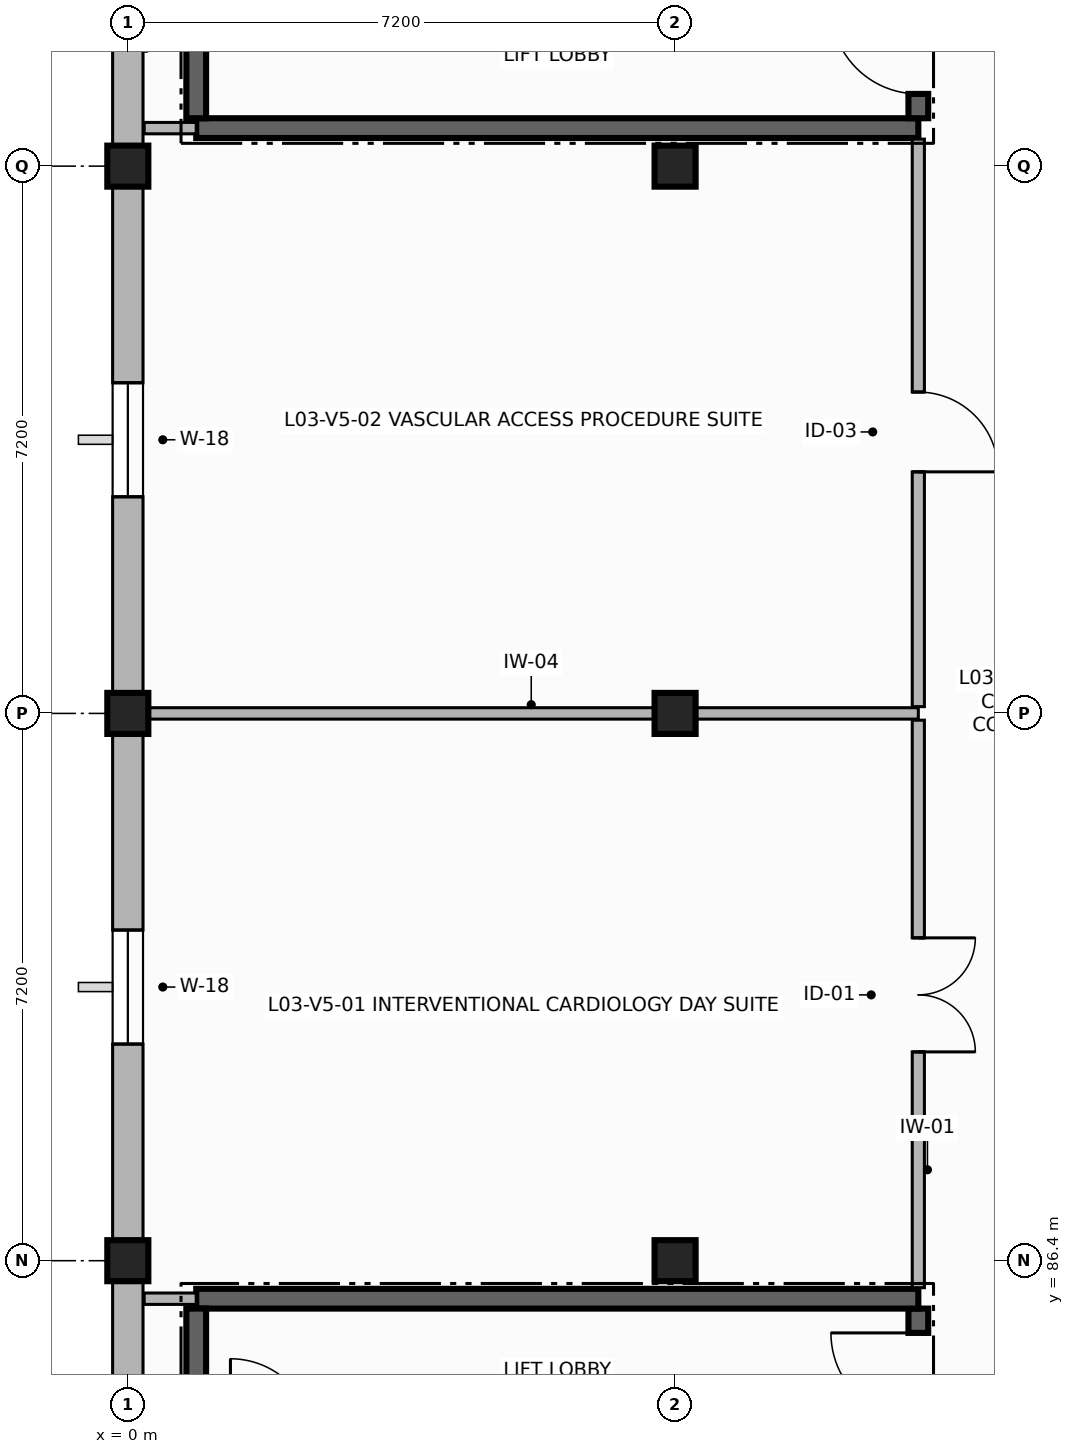
"""IFC4 building model, lengths in metres.
Left out: names, types, materials, properties, quantities, classifications, styles, units other than length and angle.
Written with IfcOpenShell. Run it as: python <this file> out.ifc"""

import sys

from ifc_helpers import new_model, si_unit, direction, frame, frame_2d, origin, origin_2d, place, context, subcontext, project, spatial, rectangle, extrude, element, fill, save


model = new_model("IFC4")
c1 = context("Model", 3, precision=1e-05, world=origin(), true_north=direction((0.0, 1.0)))
c2 = subcontext(c1, "Body", "Model", "MODEL_VIEW")
j1 = project(units=[si_unit("LENGTHUNIT", "METRE"), si_unit("PLANEANGLEUNIT", "RADIAN")], contexts=[c1])
p1 = place(None, origin())
s1 = spatial("IfcSite", under=j1, at=p1, CompositionType="ELEMENT")
p2 = place(p1, origin())
s2 = spatial("IfcBuilding", under=s1, at=p2, CompositionType="ELEMENT")
p3 = place(p2, frame((0.0, 0.0, 12.3)))
s3 = spatial("IfcBuildingStorey", under=s2, at=p3, CompositionType="ELEMENT", Elevation=12.3)
for number, where, z_axis, x_axis in (
    (1, (0.0, 86.4, 0.0), (0.0, 0.0, 1.0), (1.0, 0.0, 0.0)),
    (2, (0.0, 93.6, 0.0), (0.0, 0.0, 1.0), (1.0, 0.0, 0.0)),
    (3, (0.0, 100.8, 0.0), (0.0, 0.0, 1.0), (1.0, 0.0, 0.0)),
    (4, (7.2, 86.4, 0.0), (0.0, 0.0, 1.0), (1.0, 0.0, 0.0)),
    (5, (7.2, 93.6, 0.0), (0.0, 0.0, 1.0), (1.0, 0.0, 0.0)),
    (6, (7.2, 100.8, 0.0), (0.0, 0.0, 1.0), (1.0, 0.0, 0.0)),
):
    element("IfcColumn", number, at=place(p3, frame(where, z_axis=z_axis, x_axis=x_axis)), inside=s3, PredefinedType="COLUMN", context=c2, shape_type="SweptSolid", body=[
        extrude(rectangle(XDim=0.54, YDim=0.54, at=origin_2d()), origin(), (0.0, 0.0, 1.0), 3.39),
    ])
p4 = place(p3, frame((0.0, 108.0, 0.0), z_axis=(0.0, 0.0, 1.0), x_axis=(0.0, -1.0, 0.0)))
e7 = element("IfcWall", 7, at=p4, inside=s3, PredefinedType="SOLIDWALL", context=c2, shape_type="SweptSolid", body=[
    extrude(rectangle(XDim=7.2, YDim=0.4, at=frame_2d((3.6, 0.0))), origin(), (0.0, 0.0, 1.0), 2.72),
])
p5 = place(p4, frame((2.6, 0.0, 0.9)))
e8 = element("IfcOpeningElement", 8, at=p5, cuts=e7, PredefinedType="OPENING", context=c2, shape_type="SweptSolid", body=[
    extrude(rectangle(XDim=1.5, YDim=1.6, at=frame_2d((0.75, 0.8))), frame((0.0, 0.21, 0.0), z_axis=(0.0, -1.0, 0.0), x_axis=(1.0, 0.0, 0.0)), (0.0, 0.0, 1.0), 0.42),
])
p6 = place(p3, frame((0.0, 100.8, 0.0), z_axis=(0.0, 0.0, 1.0), x_axis=(0.0, -1.0, 0.0)))
e9 = element("IfcWall", 9, at=p6, inside=s3, PredefinedType="SOLIDWALL", context=c2, shape_type="SweptSolid", body=[
    extrude(rectangle(XDim=7.2, YDim=0.4, at=frame_2d((3.6, 0.0))), origin(), (0.0, 0.0, 1.0), 2.72),
])
p7 = place(p6, frame((2.85, 0.0, 0.9)))
e10 = element("IfcOpeningElement", 10, at=p7, cuts=e9, PredefinedType="OPENING", context=c2, shape_type="SweptSolid", body=[
    extrude(rectangle(XDim=1.5, YDim=1.6, at=frame_2d((0.75, 0.8))), frame((0.0, 0.21, 0.0), z_axis=(0.0, -1.0, 0.0), x_axis=(1.0, 0.0, 0.0)), (0.0, 0.0, 1.0), 0.42),
])
p8 = place(p3, frame((0.0, 93.6, 0.0), z_axis=(0.0, 0.0, 1.0), x_axis=(0.0, -1.0, 0.0)))
e11 = element("IfcWall", 11, at=p8, inside=s3, PredefinedType="SOLIDWALL", context=c2, shape_type="SweptSolid", body=[
    extrude(rectangle(XDim=7.2, YDim=0.4, at=frame_2d((3.6, 0.0))), origin(), (0.0, 0.0, 1.0), 2.72),
])
p9 = place(p8, frame((2.85, 0.0, 0.9)))
e12 = element("IfcOpeningElement", 12, at=p9, cuts=e11, PredefinedType="OPENING", context=c2, shape_type="SweptSolid", body=[
    extrude(rectangle(XDim=1.5, YDim=1.6, at=frame_2d((0.75, 0.8))), frame((0.0, 0.21, 0.0), z_axis=(0.0, -1.0, 0.0), x_axis=(1.0, 0.0, 0.0)), (0.0, 0.0, 1.0), 0.42),
])
p10 = place(p3, frame((0.0, 86.4, 0.0), z_axis=(0.0, 0.0, 1.0), x_axis=(0.0, -1.0, 0.0)))
e13 = element("IfcWall", 13, at=p10, inside=s3, PredefinedType="SOLIDWALL", context=c2, shape_type="SweptSolid", body=[
    extrude(rectangle(XDim=7.2, YDim=0.4, at=frame_2d((3.6, 0.0))), origin(), (0.0, 0.0, 1.0), 2.72),
])
p11 = place(p10, frame((3.1, 0.0, 0.9)))
e14 = element("IfcOpeningElement", 14, at=p11, cuts=e13, PredefinedType="OPENING", context=c2, shape_type="SweptSolid", body=[
    extrude(rectangle(XDim=1.5, YDim=1.6, at=frame_2d((0.75, 0.8))), frame((0.0, 0.21, 0.0), z_axis=(0.0, -1.0, 0.0), x_axis=(1.0, 0.0, 0.0)), (0.0, 0.0, 1.0), 0.42),
])
p12 = place(p3, frame((10.4, 80.23, 0.0), z_axis=(0.0, 0.0, 1.0), x_axis=(0.0, 1.0, 0.0)))
e15 = element("IfcWall", 15, at=p12, inside=s3, PredefinedType="SHEAR", context=c2, shape_type="SweptSolid", body=[
    extrude(rectangle(XDim=5.54, YDim=0.26, at=frame_2d((2.77, 0.0))), origin(), (0.0, 0.0, 1.0), 3.39),
])
p13 = place(p12, frame((4.07, 0.0, 0.0)))
e16 = element("IfcOpeningElement", 16, at=p13, cuts=e15, PredefinedType="OPENING", context=c2, shape_type="SweptSolid", body=[
    extrude(rectangle(XDim=1.15, YDim=2.2, at=frame_2d((0.575, 1.1))), frame((0.0, 0.14, 0.0), z_axis=(0.0, -1.0, 0.0), x_axis=(1.0, 0.0, 0.0)), (0.0, 0.0, 1.0), 0.28),
])
p14 = place(p3, frame((10.4, 85.9, 0.0), z_axis=(0.0, 0.0, 1.0), x_axis=(-1.0, 0.0, 0.0)))
e17 = element("IfcWall", 17, at=p14, inside=s3, PredefinedType="SHEAR", context=c2, shape_type="SweptSolid", body=[
    extrude(rectangle(XDim=9.5, YDim=0.26, at=frame_2d((4.75, 0.0))), origin(), (0.0, 0.0, 1.0), 3.39),
])
p15 = place(p3, frame((0.9, 85.77, 0.0), z_axis=(0.0, 0.0, 1.0), x_axis=(0.0, -1.0, 0.0)))
e18 = element("IfcWall", 18, at=p15, inside=s3, PredefinedType="SHEAR", context=c2, shape_type="SweptSolid", body=[
    extrude(rectangle(XDim=5.54, YDim=0.26, at=frame_2d((2.77, 0.0))), origin(), (0.0, 0.0, 1.0), 3.39),
])
p16 = place(p3, frame((0.9, 101.3, 0.0), z_axis=(0.0, 0.0, 1.0), x_axis=(1.0, 0.0, 0.0)))
e19 = element("IfcWall", 19, at=p16, inside=s3, PredefinedType="SHEAR", context=c2, shape_type="SweptSolid", body=[
    extrude(rectangle(XDim=9.5, YDim=0.26, at=frame_2d((4.75, 0.0))), origin(), (0.0, 0.0, 1.0), 3.39),
])
p17 = place(p3, frame((10.4, 101.43, 0.0), z_axis=(0.0, 0.0, 1.0), x_axis=(0.0, 1.0, 0.0)))
e20 = element("IfcWall", 20, at=p17, inside=s3, PredefinedType="SHEAR", context=c2, shape_type="SweptSolid", body=[
    extrude(rectangle(XDim=5.54, YDim=0.26, at=frame_2d((2.77, 0.0))), origin(), (0.0, 0.0, 1.0), 3.39),
])
p18 = place(p17, frame((0.32, 0.0, 0.0)))
e21 = element("IfcOpeningElement", 21, at=p18, cuts=e20, PredefinedType="OPENING", context=c2, shape_type="SweptSolid", body=[
    extrude(rectangle(XDim=1.15, YDim=2.2, at=frame_2d((0.575, 1.1))), frame((0.0, 0.14, 0.0), z_axis=(0.0, -1.0, 0.0), x_axis=(1.0, 0.0, 0.0)), (0.0, 0.0, 1.0), 0.28),
])
p19 = place(p3, frame((0.9, 106.97, 0.0), z_axis=(0.0, 0.0, 1.0), x_axis=(0.0, -1.0, 0.0)))
e22 = element("IfcWall", 22, at=p19, inside=s3, PredefinedType="SHEAR", context=c2, shape_type="SweptSolid", body=[
    extrude(rectangle(XDim=5.54, YDim=0.26, at=frame_2d((2.77, 0.0))), origin(), (0.0, 0.0, 1.0), 3.39),
])
p20 = place(p3, frame((0.215, 93.6, 0.0), z_axis=(0.0, 0.0, 1.0), x_axis=(1.0, 0.0, 0.0)))
e23 = element("IfcWall", 23, at=p20, inside=s3, PredefinedType="PARTITIONING", context=c2, shape_type="SweptSolid", body=[
    extrude(rectangle(XDim=10.185, YDim=0.15, at=frame_2d((5.092, 0.0))), origin(), (0.0, 0.0, 1.0), 2.7),
])
p21 = place(p3, frame((10.4, 93.511, 0.0), z_axis=(0.0, 0.0, 1.0), x_axis=(0.0, -1.0, 0.0)))
e24 = element("IfcWall", 24, at=p21, inside=s3, PredefinedType="PARTITIONING", context=c2, shape_type="SweptSolid", body=[
    extrude(rectangle(XDim=7.466, YDim=0.16, at=frame_2d((3.733, 0.0))), origin(), (0.0, 0.0, 1.0), 2.7),
])
p22 = place(p21, frame((2.864, 0.0, 0.0)))
e25 = element("IfcOpeningElement", 25, at=p22, cuts=e24, PredefinedType="OPENING", context=c2, shape_type="SweptSolid", body=[
    extrude(rectangle(XDim=1.5, YDim=2.3, at=frame_2d((0.75, 1.15))), frame((0.0, 0.09, 0.0), z_axis=(0.0, -1.0, 0.0), x_axis=(1.0, 0.0, 0.0)), (0.0, 0.0, 1.0), 0.18),
])
for number, where, z_axis, x_axis in (
    (26, (0.9, 85.9, 0.0), (0.0, 0.0, 1.0), (-1.0, 0.0, 0.0)),
    (27, (0.215, 101.3, 0.0), (0.0, 0.0, 1.0), (1.0, 0.0, 0.0)),
):
    element("IfcWall", number, at=place(p3, frame(where, z_axis=z_axis, x_axis=x_axis)), inside=s3, PredefinedType="PARTITIONING", context=c2, shape_type="SweptSolid", body=[
        extrude(rectangle(XDim=0.685, YDim=0.15, at=frame_2d((0.342, 0.0))), origin(), (0.0, 0.0, 1.0), 2.7),
    ])
p23 = place(p3, frame((10.4, 101.155, 0.0), z_axis=(0.0, 0.0, 1.0), x_axis=(0.0, -1.0, 0.0)))
e28 = element("IfcWall", 28, at=p23, inside=s3, PredefinedType="PARTITIONING", context=c2, shape_type="SweptSolid", body=[
    extrude(rectangle(XDim=7.466, YDim=0.16, at=frame_2d((3.733, 0.0))), origin(), (0.0, 0.0, 1.0), 2.7),
])
p24 = place(p23, frame((3.327, 0.0, 0.0)))
e29 = element("IfcOpeningElement", 29, at=p24, cuts=e28, PredefinedType="OPENING", context=c2, shape_type="SweptSolid", body=[
    extrude(rectangle(XDim=1.05, YDim=2.15, at=frame_2d((0.525, 1.075))), frame((0.0, 0.09, 0.0), z_axis=(0.0, -1.0, 0.0), x_axis=(1.0, 0.0, 0.0)), (0.0, 0.0, 1.0), 0.18),
])
p25 = place(p7, origin())
e30 = element("IfcWindow", 30, at=p25, inside=s3, PartitioningType="SINGLE_PANEL", PredefinedType="WINDOW", context=c2, shape_type="SweptSolid", body=[
    extrude(rectangle(XDim=1.5, YDim=1.6, at=frame_2d((0.75, 0.8))), frame((0.0, 0.03, 0.0), z_axis=(0.0, -1.0, 0.0), x_axis=(1.0, 0.0, 0.0)), (0.0, 0.0, 1.0), 0.06),
])
fill(e10, e30)
p26 = place(p9, origin())
e31 = element("IfcWindow", 31, at=p26, inside=s3, PartitioningType="SINGLE_PANEL", PredefinedType="WINDOW", context=c2, shape_type="SweptSolid", body=[
    extrude(rectangle(XDim=1.5, YDim=1.6, at=frame_2d((0.75, 0.8))), frame((0.0, 0.03, 0.0), z_axis=(0.0, -1.0, 0.0), x_axis=(1.0, 0.0, 0.0)), (0.0, 0.0, 1.0), 0.06),
])
fill(e12, e31)
p27 = place(p13, origin())
e32 = element("IfcDoor", 32, at=p27, inside=s3, OperationType="SINGLE_SWING_RIGHT", PredefinedType="DOOR", context=c2, shape_type="SweptSolid", body=[
    extrude(rectangle(XDim=1.15, YDim=2.2, at=frame_2d((0.575, 1.1))), frame((0.0, 0.025, 0.0), z_axis=(0.0, -1.0, 0.0), x_axis=(1.0, 0.0, 0.0)), (0.0, 0.0, 1.0), 0.05),
])
fill(e16, e32)
p28 = place(p18, origin())
e33 = element("IfcDoor", 33, at=p28, inside=s3, OperationType="SINGLE_SWING_RIGHT", PredefinedType="DOOR", context=c2, shape_type="SweptSolid", body=[
    extrude(rectangle(XDim=1.15, YDim=2.2, at=frame_2d((0.575, 1.1))), frame((0.0, 0.025, 0.0), z_axis=(0.0, -1.0, 0.0), x_axis=(1.0, 0.0, 0.0)), (0.0, 0.0, 1.0), 0.05),
])
fill(e21, e33)
p29 = place(p22, origin())
e34 = element("IfcDoor", 34, at=p29, inside=s3, OperationType="DOUBLE_DOOR_SINGLE_SWING", PredefinedType="DOOR", context=c2, shape_type="SweptSolid", body=[
    extrude(rectangle(XDim=1.5, YDim=2.3, at=frame_2d((0.75, 1.15))), frame((0.0, 0.025, 0.0), z_axis=(0.0, -1.0, 0.0), x_axis=(1.0, 0.0, 0.0)), (0.0, 0.0, 1.0), 0.05),
])
fill(e25, e34)
p30 = place(p24, origin())
e35 = element("IfcDoor", 35, at=p30, inside=s3, OperationType="SINGLE_SWING_RIGHT", PredefinedType="DOOR", context=c2, shape_type="SweptSolid", body=[
    extrude(rectangle(XDim=1.05, YDim=2.15, at=frame_2d((0.525, 1.075))), frame((0.0, 0.025, 0.0), z_axis=(0.0, -1.0, 0.0), x_axis=(1.0, 0.0, 0.0)), (0.0, 0.0, 1.0), 0.05),
])
fill(e29, e35)
save(model, sys.argv[1])
